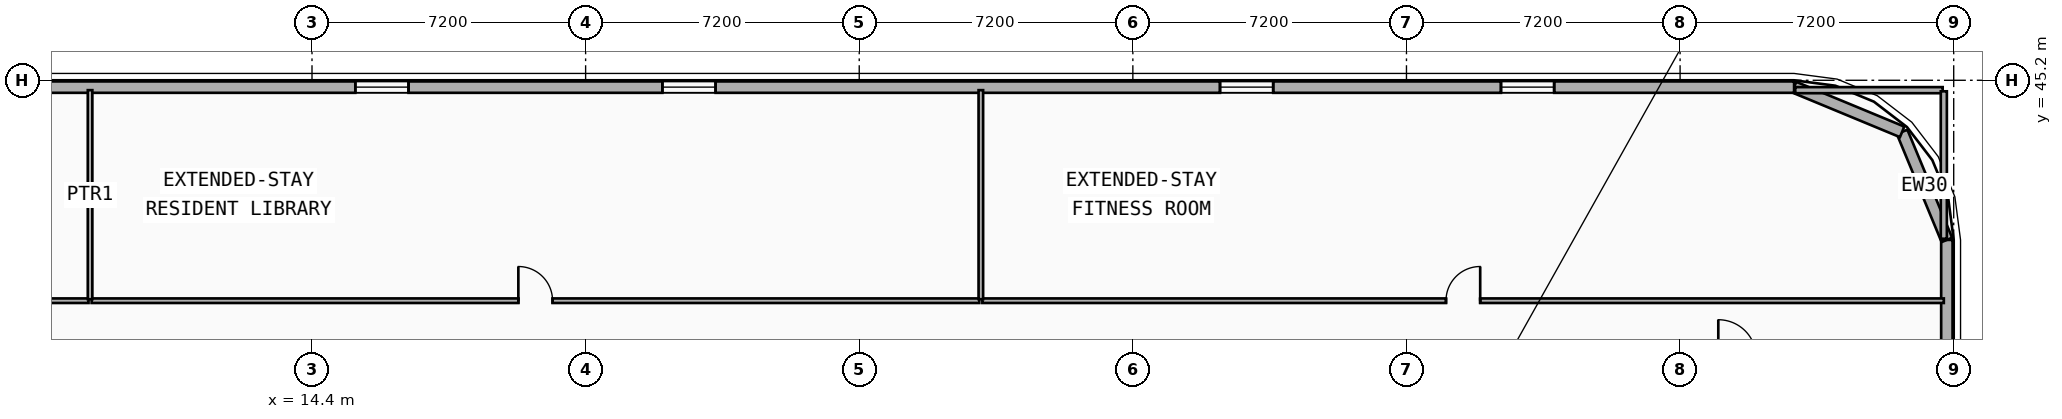
"""IFC4 building model, lengths in metres.
Left out: names, types, materials, properties, quantities, classifications, styles, units other than length and angle.
Written with IfcOpenShell. Run it as: python <this file> out.ifc"""

import sys

from ifc_helpers import new_model, si_unit, direction, frame, frame_2d, origin, place, context, subcontext, project, spatial, rectangle, extrude, element, fill, save


model = new_model("IFC4")
c1 = context("Model", 3, precision=1e-05, world=origin(), true_north=direction((0.0, 1.0)))
c2 = subcontext(c1, "Body", "Model", "MODEL_VIEW")
j1 = project(units=[si_unit("LENGTHUNIT", "METRE"), si_unit("PLANEANGLEUNIT", "RADIAN")], contexts=[c1])
p1 = place(None, origin())
s1 = spatial("IfcSite", under=j1, at=p1, CompositionType="ELEMENT")
p2 = place(p1, origin())
s2 = spatial("IfcBuilding", under=s1, at=p2, CompositionType="ELEMENT")
p3 = place(p2, frame((0.0, 0.0, 67.5)))
s3 = spatial("IfcBuildingStorey", under=s2, at=p3, CompositionType="ELEMENT", Elevation=67.5)
p4 = place(p3, frame((57.42, 41.0, 0.0), z_axis=(0.0, 0.0, 1.0), x_axis=(0.0, -1.0, 0.0)))
e1 = element("IfcWall", 1, at=p4, inside=s3, PredefinedType="SOLIDWALL", context=c2, shape_type="SweptSolid", body=[
    extrude(rectangle(XDim=15.2, YDim=0.3, at=frame_2d((7.6, 0.0))), origin(), (0.0, 0.0, 1.0), 3.24),
])
p5 = place(p4, frame((8.781, 0.0, 0.48)))
e2 = element("IfcOpeningElement", 2, at=p5, cuts=e1, PredefinedType="OPENING", context=c2, shape_type="SweptSolid", body=[
    extrude(rectangle(XDim=1.4, YDim=1.8, at=frame_2d((0.7, 0.9))), frame((0.0, 0.16, 0.0), z_axis=(0.0, -1.0, 0.0), x_axis=(1.0, 0.0, 0.0)), (0.0, 0.0, 1.0), 0.32),
])
p6 = place(p4, frame((10.94, 0.0, 0.48)))
e3 = element("IfcOpeningElement", 3, at=p6, cuts=e1, PredefinedType="OPENING", context=c2, shape_type="SweptSolid", body=[
    extrude(rectangle(XDim=1.4, YDim=1.8, at=frame_2d((0.7, 0.9))), frame((0.0, 0.16, 0.0), z_axis=(0.0, -1.0, 0.0), x_axis=(1.0, 0.0, 0.0)), (0.0, 0.0, 1.0), 0.32),
])
p7 = place(p4, frame((3.807, 0.0, 0.48)))
e4 = element("IfcOpeningElement", 4, at=p7, cuts=e1, PredefinedType="OPENING", context=c2, shape_type="SweptSolid", body=[
    extrude(rectangle(XDim=1.4, YDim=1.8, at=frame_2d((0.7, 0.9))), frame((0.0, 0.16, 0.0), z_axis=(0.0, -1.0, 0.0), x_axis=(1.0, 0.0, 0.0)), (0.0, 0.0, 1.0), 0.32),
])
p8 = place(p4, frame((5.614, 0.0, 0.48)))
e5 = element("IfcOpeningElement", 5, at=p8, cuts=e1, PredefinedType="OPENING", context=c2, shape_type="SweptSolid", body=[
    extrude(rectangle(XDim=1.4, YDim=1.8, at=frame_2d((0.7, 0.9))), frame((0.0, 0.16, 0.0), z_axis=(0.0, -1.0, 0.0), x_axis=(1.0, 0.0, 0.0)), (0.0, 0.0, 1.0), 0.32),
])
p9 = place(p3, frame((56.243, 43.843, 0.0), z_axis=(0.0, 0.0, 1.0), x_axis=(0.382636798336, -0.92389884758, 0.0)))
e6 = element("IfcWall", 6, at=p9, inside=s3, PredefinedType="SOLIDWALL", context=c2, shape_type="SweptSolid", body=[
    extrude(rectangle(XDim=3.077, YDim=0.3, at=frame_2d((1.538, 0.0))), origin(), (0.0, 0.0, 1.0), 3.24),
])
p10 = place(p3, frame((53.4, 45.02, 0.0), z_axis=(0.0, 0.0, 1.0), x_axis=(0.923882414032, -0.382676475685, 0.0)))
e7 = element("IfcWall", 7, at=p10, inside=s3, PredefinedType="SOLIDWALL", context=c2, shape_type="SweptSolid", body=[
    extrude(rectangle(XDim=3.077, YDim=0.3, at=frame_2d((1.539, 0.0))), origin(), (0.0, 0.0, 1.0), 3.24),
])
p11 = place(p3, frame((4.2, 45.02, 0.0), z_axis=(0.0, 0.0, 1.0), x_axis=(1.0, 0.0, 0.0)))
e8 = element("IfcWall", 8, at=p11, inside=s3, PredefinedType="SOLIDWALL", context=c2, shape_type="SweptSolid", body=[
    extrude(rectangle(XDim=49.2, YDim=0.3, at=frame_2d((24.6, 0.0))), origin(), (0.0, 0.0, 1.0), 3.24),
])
p12 = place(p11, frame((11.34, 0.0, 0.85)))
e9 = element("IfcOpeningElement", 9, at=p12, cuts=e8, PredefinedType="OPENING", context=c2, shape_type="SweptSolid", body=[
    extrude(rectangle(XDim=1.4, YDim=1.8, at=frame_2d((0.7, 0.9))), frame((0.0, 0.16, 0.0), z_axis=(0.0, -1.0, 0.0), x_axis=(1.0, 0.0, 0.0)), (0.0, 0.0, 1.0), 0.32),
])
p13 = place(p11, frame((19.42, 0.0, 0.85)))
e10 = element("IfcOpeningElement", 10, at=p13, cuts=e8, PredefinedType="OPENING", context=c2, shape_type="SweptSolid", body=[
    extrude(rectangle(XDim=1.4, YDim=1.8, at=frame_2d((0.7, 0.9))), frame((0.0, 0.16, 0.0), z_axis=(0.0, -1.0, 0.0), x_axis=(1.0, 0.0, 0.0)), (0.0, 0.0, 1.0), 0.32),
])
p14 = place(p11, frame((34.093, 0.0, 0.85)))
e11 = element("IfcOpeningElement", 11, at=p14, cuts=e8, PredefinedType="OPENING", context=c2, shape_type="SweptSolid", body=[
    extrude(rectangle(XDim=1.4, YDim=1.8, at=frame_2d((0.7, 0.9))), frame((0.0, 0.16, 0.0), z_axis=(0.0, -1.0, 0.0), x_axis=(1.0, 0.0, 0.0)), (0.0, 0.0, 1.0), 0.32),
])
p15 = place(p11, frame((41.487, 0.0, 0.85)))
e12 = element("IfcOpeningElement", 12, at=p15, cuts=e8, PredefinedType="OPENING", context=c2, shape_type="SweptSolid", body=[
    extrude(rectangle(XDim=1.4, YDim=1.8, at=frame_2d((0.7, 0.9))), frame((0.0, 0.16, 0.0), z_axis=(0.0, -1.0, 0.0), x_axis=(1.0, 0.0, 0.0)), (0.0, 0.0, 1.0), 0.32),
])
p16 = place(p3, frame((0.26, 39.4, 0.0), z_axis=(0.0, 0.0, 1.0), x_axis=(1.0, 0.0, 0.0)))
e13 = element("IfcWall", 13, at=p16, inside=s3, PredefinedType="PARTITIONING", context=c2, shape_type="SweptSolid", body=[
    extrude(rectangle(XDim=8.26, YDim=0.12, at=frame_2d((4.13, 0.0))), origin(), (0.0, 0.0, 1.0), 3.24),
])
p17 = place(p16, frame((3.68, 0.0, 0.0)))
e14 = element("IfcOpeningElement", 14, at=p17, cuts=e13, PredefinedType="OPENING", context=c2, shape_type="SweptSolid", body=[
    extrude(rectangle(XDim=0.9, YDim=2.1, at=frame_2d((0.45, 1.05))), frame((0.0, 0.07, 0.0), z_axis=(0.0, -1.0, 0.0), x_axis=(1.0, 0.0, 0.0)), (0.0, 0.0, 1.0), 0.14),
])
p18 = place(p3, frame((8.6, 39.4, 0.0), z_axis=(0.0, 0.0, 1.0), x_axis=(1.0, 0.0, 0.0)))
e15 = element("IfcWall", 15, at=p18, inside=s3, PredefinedType="PARTITIONING", context=c2, shape_type="SweptSolid", body=[
    extrude(rectangle(XDim=23.36, YDim=0.12, at=frame_2d((11.68, 0.0))), origin(), (0.0, 0.0, 1.0), 3.24),
])
p19 = place(p18, frame((11.23, 0.0, 0.0)))
e16 = element("IfcOpeningElement", 16, at=p19, cuts=e15, PredefinedType="OPENING", context=c2, shape_type="SweptSolid", body=[
    extrude(rectangle(XDim=0.9, YDim=2.1, at=frame_2d((0.45, 1.05))), frame((0.0, 0.07, 0.0), z_axis=(0.0, -1.0, 0.0), x_axis=(1.0, 0.0, 0.0)), (0.0, 0.0, 1.0), 0.14),
])
p20 = place(p3, frame((32.04, 39.4, 0.0), z_axis=(0.0, 0.0, 1.0), x_axis=(1.0, 0.0, 0.0)))
e17 = element("IfcWall", 17, at=p20, inside=s3, PredefinedType="PARTITIONING", context=c2, shape_type="SweptSolid", body=[
    extrude(rectangle(XDim=25.3, YDim=0.12, at=frame_2d((12.65, 0.0))), origin(), (0.0, 0.0, 1.0), 3.24),
])
p21 = place(p20, frame((12.2, 0.0, 0.0)))
e18 = element("IfcOpeningElement", 18, at=p21, cuts=e17, PredefinedType="OPENING", context=c2, shape_type="SweptSolid", body=[
    extrude(rectangle(XDim=0.9, YDim=2.1, at=frame_2d((0.45, 1.05))), frame((0.0, 0.07, 0.0), z_axis=(0.0, -1.0, 0.0), x_axis=(1.0, 0.0, 0.0)), (0.0, 0.0, 1.0), 0.14),
])
for number, where, z_axis, x_axis in (
    (19, (8.56, 39.44, 0.0), (0.0, 0.0, 1.0), (0.0, 1.0, 0.0)),
    (20, (32.0, 39.44, 0.0), (0.0, 0.0, 1.0), (0.0, 1.0, 0.0)),
):
    element("IfcWall", number, at=place(p3, frame(where, z_axis=z_axis, x_axis=x_axis)), inside=s3, PredefinedType="PARTITIONING", context=c2, shape_type="SweptSolid", body=[
        extrude(rectangle(XDim=5.5, YDim=0.12, at=frame_2d((2.75, 0.0))), origin(), (0.0, 0.0, 1.0), 3.24),
    ])
p22 = place(p3, frame((53.43, 44.94, 0.0), z_axis=(0.0, 0.0, 1.0), x_axis=(1.0, 0.0, 0.0)))
e21 = element("IfcWall", 21, at=p22, inside=s3, PredefinedType="PARTITIONING", context=c2, shape_type="SweptSolid", body=[
    extrude(rectangle(XDim=3.88, YDim=0.16, at=frame_2d((1.94, 0.0))), origin(), (0.0, 0.0, 1.0), 3.24),
])
p23 = place(p3, frame((57.34, 41.03, 0.0), z_axis=(0.0, 0.0, 1.0), x_axis=(0.0, 1.0, 0.0)))
e22 = element("IfcWall", 22, at=p23, inside=s3, PredefinedType="PARTITIONING", context=c2, shape_type="SweptSolid", body=[
    extrude(rectangle(XDim=3.88, YDim=0.16, at=frame_2d((1.94, 0.0))), origin(), (0.0, 0.0, 1.0), 3.24),
])
p24 = place(p12, origin())
e23 = element("IfcWindow", 23, at=p24, inside=s3, PartitioningType="SINGLE_PANEL", PredefinedType="WINDOW", context=c2, shape_type="SweptSolid", body=[
    extrude(rectangle(XDim=1.4, YDim=1.8, at=frame_2d((0.7, 0.9))), frame((0.0, 0.03, 0.0), z_axis=(0.0, -1.0, 0.0), x_axis=(1.0, 0.0, 0.0)), (0.0, 0.0, 1.0), 0.06),
])
fill(e9, e23)
p25 = place(p13, origin())
e24 = element("IfcWindow", 24, at=p25, inside=s3, PartitioningType="SINGLE_PANEL", PredefinedType="WINDOW", context=c2, shape_type="SweptSolid", body=[
    extrude(rectangle(XDim=1.4, YDim=1.8, at=frame_2d((0.7, 0.9))), frame((0.0, 0.03, 0.0), z_axis=(0.0, -1.0, 0.0), x_axis=(1.0, 0.0, 0.0)), (0.0, 0.0, 1.0), 0.06),
])
fill(e10, e24)
p26 = place(p14, origin())
e25 = element("IfcWindow", 25, at=p26, inside=s3, PartitioningType="SINGLE_PANEL", PredefinedType="WINDOW", context=c2, shape_type="SweptSolid", body=[
    extrude(rectangle(XDim=1.4, YDim=1.8, at=frame_2d((0.7, 0.9))), frame((0.0, 0.03, 0.0), z_axis=(0.0, -1.0, 0.0), x_axis=(1.0, 0.0, 0.0)), (0.0, 0.0, 1.0), 0.06),
])
fill(e11, e25)
p27 = place(p15, origin())
e26 = element("IfcWindow", 26, at=p27, inside=s3, PartitioningType="SINGLE_PANEL", PredefinedType="WINDOW", context=c2, shape_type="SweptSolid", body=[
    extrude(rectangle(XDim=1.4, YDim=1.8, at=frame_2d((0.7, 0.9))), frame((0.0, 0.03, 0.0), z_axis=(0.0, -1.0, 0.0), x_axis=(1.0, 0.0, 0.0)), (0.0, 0.0, 1.0), 0.06),
])
fill(e12, e26)
p28 = place(p19, origin())
e27 = element("IfcDoor", 27, at=p28, inside=s3, OperationType="SINGLE_SWING_LEFT", PredefinedType="DOOR", context=c2, shape_type="SweptSolid", body=[
    extrude(rectangle(XDim=0.9, YDim=2.1, at=frame_2d((0.45, 1.05))), frame((0.0, 0.025, 0.0), z_axis=(0.0, -1.0, 0.0), x_axis=(1.0, 0.0, 0.0)), (0.0, 0.0, 1.0), 0.05),
])
fill(e16, e27)
p29 = place(p21, origin())
e28 = element("IfcDoor", 28, at=p29, inside=s3, OperationType="SINGLE_SWING_RIGHT", PredefinedType="DOOR", context=c2, shape_type="SweptSolid", body=[
    extrude(rectangle(XDim=0.9, YDim=2.1, at=frame_2d((0.45, 1.05))), frame((0.0, 0.025, 0.0), z_axis=(0.0, -1.0, 0.0), x_axis=(1.0, 0.0, 0.0)), (0.0, 0.0, 1.0), 0.05),
])
fill(e18, e28)
save(model, sys.argv[1])
